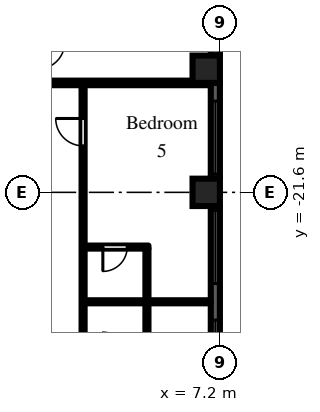
"""IFC4 building model, lengths in metres.
Left out: names, types, materials, properties, quantities, classifications, styles, units other than length and angle.
Written with IfcOpenShell. Run it as: python <this file> out.ifc"""

import sys

from ifc_helpers import new_model, si_unit, direction, frame, frame_2d, origin, origin_2d, place, context, subcontext, project, spatial, rectangle, extrude, element, fill, save


model = new_model("IFC4")
c1 = context("Model", 3, precision=1e-05, world=origin(), true_north=direction((0.0, 1.0)))
c2 = subcontext(c1, "Body", "Model", "MODEL_VIEW")
j1 = project(units=[si_unit("LENGTHUNIT", "METRE"), si_unit("PLANEANGLEUNIT", "RADIAN")], contexts=[c1])
p1 = place(None, origin())
s1 = spatial("IfcSite", under=j1, at=p1, CompositionType="ELEMENT")
p2 = place(p1, origin())
s2 = spatial("IfcBuilding", under=s1, at=p2, CompositionType="ELEMENT")
p3 = place(p2, frame((0.0, 0.0, 59.7)))
s3 = spatial("IfcBuildingStorey", under=s2, at=p3, CompositionType="ELEMENT", Elevation=59.7)
for number, where, z_axis, x_axis in (
    (1, (6.75, -21.6, 0.0), (0.0, 0.0, 1.0), (1.0, 0.0, 0.0)),
    (2, (6.75, -17.55, 0.0), (0.0, 0.0, 1.0), (1.0, 0.0, 0.0)),
):
    element("IfcColumn", number, at=place(p3, frame(where, z_axis=z_axis, x_axis=x_axis)), inside=s3, PredefinedType="COLUMN", context=c2, shape_type="SweptSolid", body=[
        extrude(rectangle(XDim=0.9, YDim=0.9, at=origin_2d()), origin(), (0.0, 0.0, 1.0), 3.0),
    ])
p4 = place(p3, frame((7.05, -28.35, 0.0), z_axis=(0.0, 0.0, 1.0), x_axis=(0.0, 1.0, 0.0)))
e3 = element("IfcWall", 3, at=p4, inside=s3, PredefinedType="SOLIDWALL", context=c2, shape_type="SweptSolid", body=[
    extrude(rectangle(XDim=6.3, YDim=0.3, at=frame_2d((3.15, 0.0))), origin(), (0.0, 0.0, 1.0), 2.1),
])
p5 = place(p4, frame((0.15, 0.0, 0.2)))
e4 = element("IfcOpeningElement", 4, at=p5, cuts=e3, PredefinedType="OPENING", context=c2, shape_type="SweptSolid", body=[
    extrude(rectangle(XDim=2.4, YDim=1.85, at=frame_2d((1.2, 0.925))), frame((0.0, 0.16, 0.0), z_axis=(0.0, -1.0, 0.0), x_axis=(1.0, 0.0, 0.0)), (0.0, 0.0, 1.0), 0.32),
])
p6 = place(p4, frame((3.75, 0.0, 0.2)))
e5 = element("IfcOpeningElement", 5, at=p6, cuts=e3, PredefinedType="OPENING", context=c2, shape_type="SweptSolid", body=[
    extrude(rectangle(XDim=2.4, YDim=1.85, at=frame_2d((1.2, 0.925))), frame((0.0, 0.16, 0.0), z_axis=(0.0, -1.0, 0.0), x_axis=(1.0, 0.0, 0.0)), (0.0, 0.0, 1.0), 0.32),
])
p7 = place(p3, frame((7.05, -21.15, 0.0), z_axis=(0.0, 0.0, 1.0), x_axis=(0.0, 1.0, 0.0)))
e6 = element("IfcWall", 6, at=p7, inside=s3, PredefinedType="SOLIDWALL", context=c2, shape_type="SweptSolid", body=[
    extrude(rectangle(XDim=3.15, YDim=0.3, at=frame_2d((1.575, 0.0))), origin(), (0.0, 0.0, 1.0), 2.1),
])
p8 = place(p7, frame((0.15, 0.0, 0.2)))
e7 = element("IfcOpeningElement", 7, at=p8, cuts=e6, PredefinedType="OPENING", context=c2, shape_type="SweptSolid", body=[
    extrude(rectangle(XDim=2.4, YDim=1.85, at=frame_2d((1.2, 0.925))), frame((0.0, 0.16, 0.0), z_axis=(0.0, -1.0, 0.0), x_axis=(1.0, 0.0, 0.0)), (0.0, 0.0, 1.0), 0.32),
])
p9 = place(p3, frame((7.05, -17.1, 0.0), z_axis=(0.0, 0.0, 1.0), x_axis=(0.0, 1.0, 0.0)))
e8 = element("IfcWall", 8, at=p9, inside=s3, PredefinedType="SOLIDWALL", context=c2, shape_type="SweptSolid", body=[
    extrude(rectangle(XDim=1.8, YDim=0.3, at=frame_2d((0.9, 0.0))), origin(), (0.0, 0.0, 1.0), 2.1),
])
p10 = place(p3, frame((1.275, -18.0, 0.0), z_axis=(0.0, 0.0, 1.0), x_axis=(1.0, 0.0, 0.0)))
e9 = element("IfcWall", 9, at=p10, inside=s3, PredefinedType="PARTITIONING", context=c2, shape_type="SweptSolid", body=[
    extrude(rectangle(XDim=5.625, YDim=0.15, at=frame_2d((2.812, 0.0))), origin(), (0.0, 0.0, 1.0), 2.55),
])
p11 = place(p3, frame((2.7, -32.35, 0.0), z_axis=(0.0, 0.0, 1.0), x_axis=(0.0, 1.0, 0.0)))
e10 = element("IfcWall", 10, at=p11, inside=s3, PredefinedType="PARTITIONING", context=c2, shape_type="SweptSolid", body=[
    extrude(rectangle(XDim=14.275, YDim=0.1, at=frame_2d((7.138, 0.0))), origin(), (0.0, 0.0, 1.0), 2.55),
])
p12 = place(p11, frame((1.12, 0.0, 0.0)))
e11 = element("IfcOpeningElement", 11, at=p12, cuts=e10, PredefinedType="OPENING", context=c2, shape_type="SweptSolid", body=[
    extrude(rectangle(XDim=0.9, YDim=2.1, at=frame_2d((0.45, 1.05))), frame((0.0, 0.06, 0.0), z_axis=(0.0, -1.0, 0.0), x_axis=(1.0, 0.0, 0.0)), (0.0, 0.0, 1.0), 0.12),
])
p13 = place(p11, frame((12.28, 0.0, 0.0)))
e12 = element("IfcOpeningElement", 12, at=p13, cuts=e10, PredefinedType="OPENING", context=c2, shape_type="SweptSolid", body=[
    extrude(rectangle(XDim=0.9, YDim=2.1, at=frame_2d((0.45, 1.05))), frame((0.0, 0.06, 0.0), z_axis=(0.0, -1.0, 0.0), x_axis=(1.0, 0.0, 0.0)), (0.0, 0.0, 1.0), 0.12),
])
p14 = place(p3, frame((2.75, -25.2, 0.0), z_axis=(0.0, 0.0, 1.0), x_axis=(1.0, 0.0, 0.0)))
e13 = element("IfcWall", 13, at=p14, inside=s3, PredefinedType="PARTITIONING", context=c2, shape_type="SweptSolid", body=[
    extrude(rectangle(XDim=4.15, YDim=0.1, at=frame_2d((2.075, 0.0))), origin(), (0.0, 0.0, 1.0), 2.55),
])
p15 = place(p3, frame((2.75, -23.4, 0.0), z_axis=(0.0, 0.0, 1.0), x_axis=(1.0, 0.0, 0.0)))
e14 = element("IfcWall", 14, at=p15, inside=s3, PredefinedType="PARTITIONING", context=c2, shape_type="SweptSolid", body=[
    extrude(rectangle(XDim=2.1, YDim=0.1, at=frame_2d((1.05, 0.0))), origin(), (0.0, 0.0, 1.0), 2.55),
])
p16 = place(p15, frame((0.6, 0.0, 0.0)))
e15 = element("IfcOpeningElement", 15, at=p16, cuts=e14, PredefinedType="OPENING", context=c2, shape_type="SweptSolid", body=[
    extrude(rectangle(XDim=0.8, YDim=2.1, at=frame_2d((0.4, 1.05))), frame((0.0, 0.06, 0.0), z_axis=(0.0, -1.0, 0.0), x_axis=(1.0, 0.0, 0.0)), (0.0, 0.0, 1.0), 0.12),
])
p17 = place(p3, frame((4.8, -26.95, 0.0), z_axis=(0.0, 0.0, 1.0), x_axis=(0.0, 1.0, 0.0)))
e16 = element("IfcWall", 16, at=p17, inside=s3, PredefinedType="PARTITIONING", context=c2, shape_type="SweptSolid", body=[
    extrude(rectangle(XDim=3.5, YDim=0.1, at=frame_2d((1.75, 0.0))), origin(), (0.0, 0.0, 1.0), 2.55),
])
p18 = place(p5, origin())
e17 = element("IfcWindow", 17, at=p18, inside=s3, PartitioningType="SINGLE_PANEL", PredefinedType="WINDOW", context=c2, shape_type="SweptSolid", body=[
    extrude(rectangle(XDim=2.4, YDim=1.85, at=frame_2d((1.2, 0.925))), frame((0.0, 0.03, 0.0), z_axis=(0.0, -1.0, 0.0), x_axis=(1.0, 0.0, 0.0)), (0.0, 0.0, 1.0), 0.06),
])
fill(e4, e17)
p19 = place(p6, origin())
e18 = element("IfcWindow", 18, at=p19, inside=s3, PartitioningType="SINGLE_PANEL", PredefinedType="WINDOW", context=c2, shape_type="SweptSolid", body=[
    extrude(rectangle(XDim=2.4, YDim=1.85, at=frame_2d((1.2, 0.925))), frame((0.0, 0.03, 0.0), z_axis=(0.0, -1.0, 0.0), x_axis=(1.0, 0.0, 0.0)), (0.0, 0.0, 1.0), 0.06),
])
fill(e5, e18)
p20 = place(p8, origin())
e19 = element("IfcWindow", 19, at=p20, inside=s3, PartitioningType="SINGLE_PANEL", PredefinedType="WINDOW", context=c2, shape_type="SweptSolid", body=[
    extrude(rectangle(XDim=2.4, YDim=1.85, at=frame_2d((1.2, 0.925))), frame((0.0, 0.03, 0.0), z_axis=(0.0, -1.0, 0.0), x_axis=(1.0, 0.0, 0.0)), (0.0, 0.0, 1.0), 0.06),
])
fill(e7, e19)
p21 = place(p13, origin())
e20 = element("IfcDoor", 20, at=p21, inside=s3, OperationType="SINGLE_SWING_RIGHT", PredefinedType="DOOR", context=c2, shape_type="SweptSolid", body=[
    extrude(rectangle(XDim=0.9, YDim=2.1, at=frame_2d((0.45, 1.05))), frame((0.0, 0.025, 0.0), z_axis=(0.0, -1.0, 0.0), x_axis=(1.0, 0.0, 0.0)), (0.0, 0.0, 1.0), 0.05),
])
fill(e12, e20)
p22 = place(p16, frame((0.8, 0.0, 0.0), z_axis=(0.0, 0.0, 1.0), x_axis=(-1.0, 0.0, 0.0)))
e21 = element("IfcDoor", 21, at=p22, inside=s3, OperationType="SINGLE_SWING_RIGHT", PredefinedType="DOOR", context=c2, shape_type="SweptSolid", body=[
    extrude(rectangle(XDim=0.8, YDim=2.1, at=frame_2d((0.4, 1.05))), frame((0.0, 0.025, 0.0), z_axis=(0.0, -1.0, 0.0), x_axis=(1.0, 0.0, 0.0)), (0.0, 0.0, 1.0), 0.05),
])
fill(e15, e21)
save(model, sys.argv[1])
